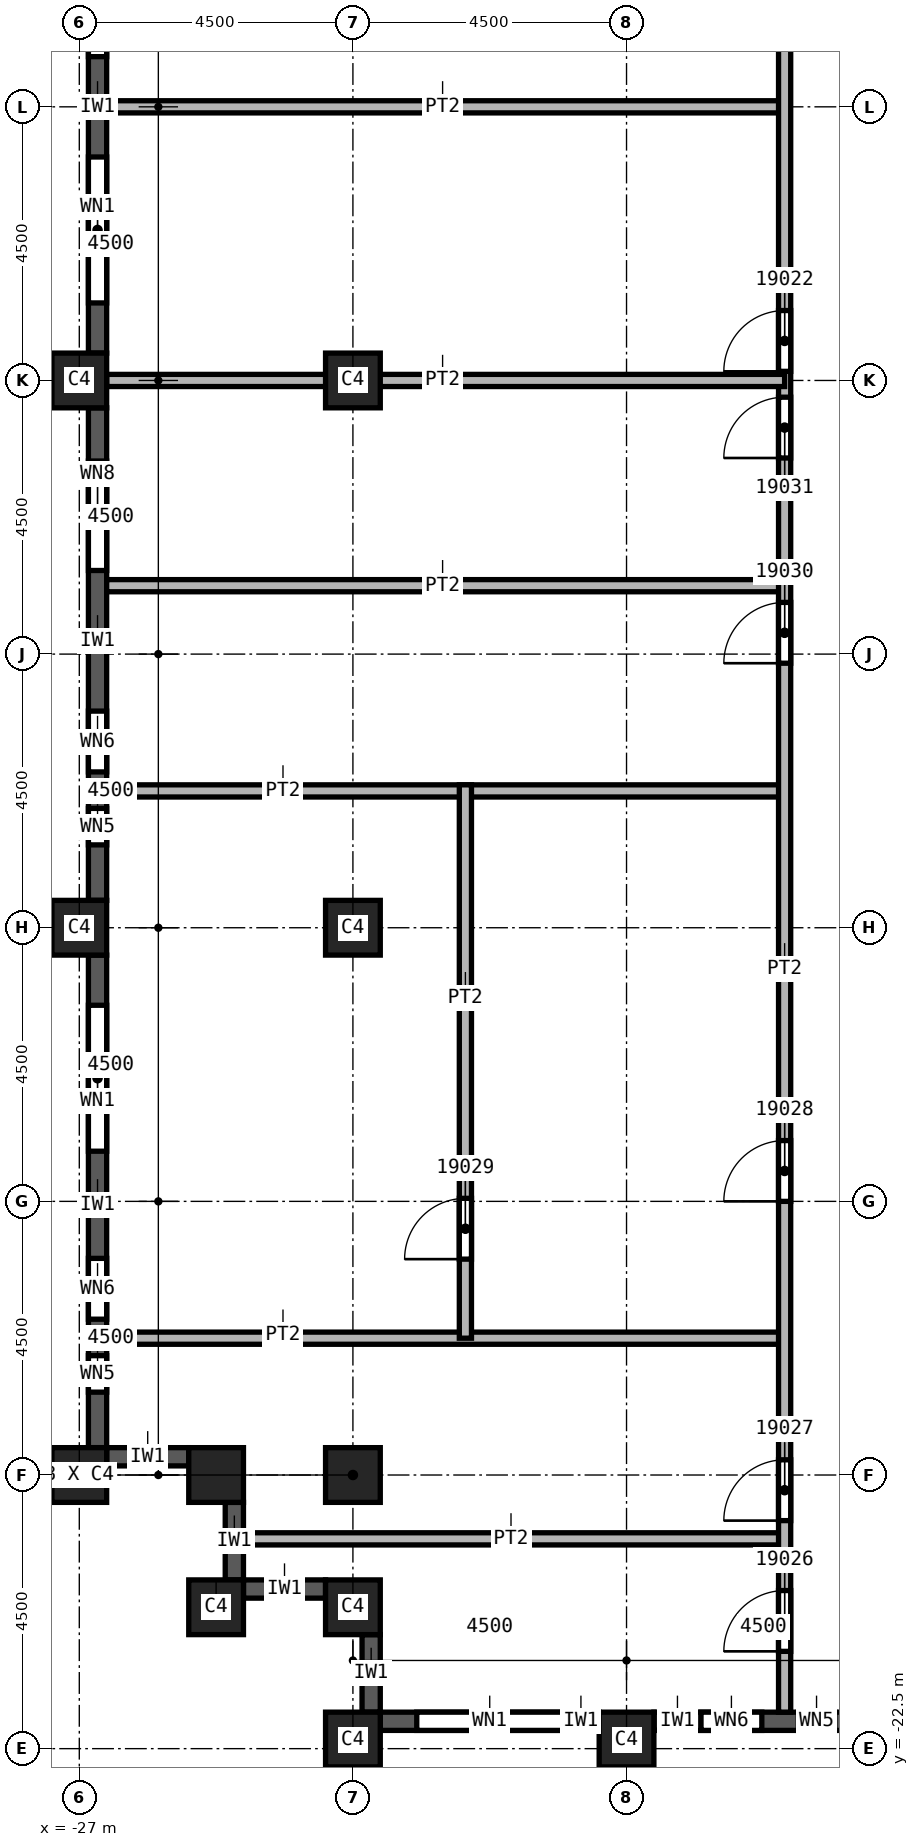
"""IFC4 building model, lengths in metres.
Left out: names, types, materials, properties, quantities, classifications, styles, units other than length and angle.
Written with IfcOpenShell. Run it as: python <this file> out.ifc"""

import sys

from ifc_helpers import new_model, si_unit, direction, frame, frame_2d, origin, origin_2d, place, context, subcontext, project, spatial, rectangle, extrude, element, fill, save


model = new_model("IFC4")
c1 = context("Model", 3, precision=1e-05, world=origin(), true_north=direction((0.0, 1.0)))
c2 = subcontext(c1, "Body", "Model", "MODEL_VIEW")
j1 = project(units=[si_unit("LENGTHUNIT", "METRE"), si_unit("PLANEANGLEUNIT", "RADIAN")], contexts=[c1])
p1 = place(None, origin())
s1 = spatial("IfcSite", under=j1, at=p1, CompositionType="ELEMENT")
p2 = place(p1, origin())
s2 = spatial("IfcBuilding", under=s1, at=p2, CompositionType="ELEMENT")
p3 = place(p2, frame((0.0, 0.0, 282.0)))
s3 = spatial("IfcBuildingStorey", under=s2, at=p3, CompositionType="ELEMENT", Elevation=282.0)
for number, where, z_axis, x_axis in (
    (1, (-22.5, 0.0, 0.0), (0.0, 0.0, 1.0), (1.0, 0.0, 0.0)),
    (2, (-22.5, -9.0, 0.0), (0.0, 0.0, 1.0), (1.0, 0.0, 0.0)),
    (3, (-22.5, -18.0, 0.0), (0.0, 0.0, 1.0), (1.0, 0.0, 0.0)),
    (4, (-18.0, -22.35, 0.0), (0.0, 0.0, 1.0), (1.0, 0.0, 0.0)),
    (5, (-22.5, -22.35, 0.0), (0.0, 0.0, 1.0), (1.0, 0.0, 0.0)),
    (6, (-27.0, 0.0, 0.0), (0.0, 0.0, 1.0), (0.0, 1.0, 0.0)),
    (7, (-27.0, -9.0, 0.0), (0.0, 0.0, 1.0), (0.0, 1.0, 0.0)),
    (8, (-27.0, -18.0, 0.0), (0.0, 0.0, 1.0), (0.0, 1.0, 0.0)),
    (9, (-22.5, -20.175, 0.0), (0.0, 0.0, 1.0), (1.0, 0.0, 0.0)),
    (10, (-24.75, -20.175, 0.0), (0.0, 0.0, 1.0), (1.0, 0.0, 0.0)),
    (11, (-24.75, -18.0, 0.0), (0.0, 0.0, 1.0), (1.0, 0.0, 0.0)),
):
    element("IfcColumn", number, at=place(p3, frame(where, z_axis=z_axis, x_axis=x_axis)), inside=s3, PredefinedType="COLUMN", context=c2, shape_type="SweptSolid", body=[
        extrude(rectangle(XDim=0.9, YDim=0.9, at=origin_2d()), origin(), (0.0, 0.0, 1.0), 3.72),
    ])
p4 = place(p3, frame((-26.7, 8.55, 0.0), z_axis=(0.0, 0.0, 1.0), x_axis=(0.0, -1.0, 0.0)))
e12 = element("IfcWall", 12, at=p4, inside=s3, PredefinedType="SOLIDWALL", context=c2, shape_type="SweptSolid", body=[
    extrude(rectangle(XDim=8.1, YDim=0.3, at=frame_2d((4.05, 0.0))), origin(), (0.0, 0.0, 1.0), 3.12),
])
p5 = place(p4, frame((0.825, 0.0, 0.8)))
e13 = element("IfcOpeningElement", 13, at=p5, cuts=e12, PredefinedType="OPENING", context=c2, shape_type="SweptSolid", body=[
    extrude(rectangle(XDim=2.4, YDim=1.95, at=frame_2d((1.2, 0.975))), frame((0.0, 0.15, 0.0), z_axis=(0.0, -1.0, 0.0), x_axis=(1.0, 0.0, 0.0)), (0.0, 0.0, 1.0), 0.3),
])
p6 = place(p4, frame((4.875, 0.0, 0.8)))
e14 = element("IfcOpeningElement", 14, at=p6, cuts=e12, PredefinedType="OPENING", context=c2, shape_type="SweptSolid", body=[
    extrude(rectangle(XDim=2.4, YDim=1.95, at=frame_2d((1.2, 0.975))), frame((0.0, 0.15, 0.0), z_axis=(0.0, -1.0, 0.0), x_axis=(1.0, 0.0, 0.0)), (0.0, 0.0, 1.0), 0.3),
])
p7 = place(p3, frame((-26.7, -0.45, 0.0), z_axis=(0.0, 0.0, 1.0), x_axis=(0.0, -1.0, 0.0)))
e15 = element("IfcWall", 15, at=p7, inside=s3, PredefinedType="SOLIDWALL", context=c2, shape_type="SweptSolid", body=[
    extrude(rectangle(XDim=8.1, YDim=0.3, at=frame_2d((4.05, 0.0))), origin(), (0.0, 0.0, 1.0), 3.12),
])
p8 = place(p7, frame((0.875, 0.0, 0.8)))
e16 = element("IfcOpeningElement", 16, at=p8, cuts=e15, PredefinedType="OPENING", context=c2, shape_type="SweptSolid", body=[
    extrude(rectangle(XDim=1.8, YDim=1.95, at=frame_2d((0.9, 0.975))), frame((0.0, 0.15, 0.0), z_axis=(0.0, -1.0, 0.0), x_axis=(1.0, 0.0, 0.0)), (0.0, 0.0, 1.0), 0.3),
])
p9 = place(p7, frame((4.988, 0.0, 0.8)))
e17 = element("IfcOpeningElement", 17, at=p9, cuts=e15, PredefinedType="OPENING", context=c2, shape_type="SweptSolid", body=[
    extrude(rectangle(XDim=1.0, YDim=1.95, at=frame_2d((0.5, 0.975))), frame((0.0, 0.15, 0.0), z_axis=(0.0, -1.0, 0.0), x_axis=(1.0, 0.0, 0.0)), (0.0, 0.0, 1.0), 0.3),
])
p10 = place(p7, frame((6.587, 0.0, 0.8)))
e18 = element("IfcOpeningElement", 18, at=p10, cuts=e15, PredefinedType="OPENING", context=c2, shape_type="SweptSolid", body=[
    extrude(rectangle(XDim=0.6, YDim=1.95, at=frame_2d((0.3, 0.975))), frame((0.0, 0.15, 0.0), z_axis=(0.0, -1.0, 0.0), x_axis=(1.0, 0.0, 0.0)), (0.0, 0.0, 1.0), 0.3),
])
p11 = place(p3, frame((-26.7, -9.45, 0.0), z_axis=(0.0, 0.0, 1.0), x_axis=(0.0, -1.0, 0.0)))
e19 = element("IfcWall", 19, at=p11, inside=s3, PredefinedType="SOLIDWALL", context=c2, shape_type="SweptSolid", body=[
    extrude(rectangle(XDim=8.1, YDim=0.3, at=frame_2d((4.05, 0.0))), origin(), (0.0, 0.0, 1.0), 3.12),
])
p12 = place(p11, frame((0.825, 0.0, 0.8)))
e20 = element("IfcOpeningElement", 20, at=p12, cuts=e19, PredefinedType="OPENING", context=c2, shape_type="SweptSolid", body=[
    extrude(rectangle(XDim=2.4, YDim=1.95, at=frame_2d((1.2, 0.975))), frame((0.0, 0.15, 0.0), z_axis=(0.0, -1.0, 0.0), x_axis=(1.0, 0.0, 0.0)), (0.0, 0.0, 1.0), 0.3),
])
p13 = place(p11, frame((4.988, 0.0, 0.8)))
e21 = element("IfcOpeningElement", 21, at=p13, cuts=e19, PredefinedType="OPENING", context=c2, shape_type="SweptSolid", body=[
    extrude(rectangle(XDim=1.0, YDim=1.95, at=frame_2d((0.5, 0.975))), frame((0.0, 0.15, 0.0), z_axis=(0.0, -1.0, 0.0), x_axis=(1.0, 0.0, 0.0)), (0.0, 0.0, 1.0), 0.3),
])
p14 = place(p11, frame((6.587, 0.0, 0.8)))
e22 = element("IfcOpeningElement", 22, at=p14, cuts=e19, PredefinedType="OPENING", context=c2, shape_type="SweptSolid", body=[
    extrude(rectangle(XDim=0.6, YDim=1.95, at=frame_2d((0.3, 0.975))), frame((0.0, 0.15, 0.0), z_axis=(0.0, -1.0, 0.0), x_axis=(1.0, 0.0, 0.0)), (0.0, 0.0, 1.0), 0.3),
])
p15 = place(p3, frame((-26.55, -17.7, 0.0), z_axis=(0.0, 0.0, 1.0), x_axis=(1.0, 0.0, 0.0)))
e23 = element("IfcWall", 23, at=p15, inside=s3, PredefinedType="SOLIDWALL", context=c2, shape_type="SweptSolid", body=[
    extrude(rectangle(XDim=1.35, YDim=0.3, at=frame_2d((0.675, 0.0))), origin(), (0.0, 0.0, 1.0), 3.12),
])
p16 = place(p3, frame((-24.45, -18.45, 0.0), z_axis=(0.0, 0.0, 1.0), x_axis=(0.0, -1.0, 0.0)))
e24 = element("IfcWall", 24, at=p16, inside=s3, PredefinedType="SOLIDWALL", context=c2, shape_type="SweptSolid", body=[
    extrude(rectangle(XDim=1.275, YDim=0.3, at=frame_2d((0.638, 0.0))), origin(), (0.0, 0.0, 1.0), 3.12),
])
p17 = place(p3, frame((-24.3, -19.875, 0.0), z_axis=(0.0, 0.0, 1.0), x_axis=(1.0, 0.0, 0.0)))
e25 = element("IfcWall", 25, at=p17, inside=s3, PredefinedType="SOLIDWALL", context=c2, shape_type="SweptSolid", body=[
    extrude(rectangle(XDim=1.35, YDim=0.3, at=frame_2d((0.675, 0.0))), origin(), (0.0, 0.0, 1.0), 3.12),
])
p18 = place(p3, frame((-22.2, -20.625, 0.0), z_axis=(0.0, 0.0, 1.0), x_axis=(0.0, -1.0, 0.0)))
e26 = element("IfcWall", 26, at=p18, inside=s3, PredefinedType="SOLIDWALL", context=c2, shape_type="SweptSolid", body=[
    extrude(rectangle(XDim=1.275, YDim=0.3, at=frame_2d((0.637, 0.0))), origin(), (0.0, 0.0, 1.0), 3.12),
])
p19 = place(p3, frame((-22.05, -22.05, 0.0), z_axis=(0.0, 0.0, 1.0), x_axis=(1.0, 0.0, 0.0)))
e27 = element("IfcWall", 27, at=p19, inside=s3, PredefinedType="SOLIDWALL", context=c2, shape_type="SweptSolid", body=[
    extrude(rectangle(XDim=3.6, YDim=0.3, at=frame_2d((1.8, 0.0))), origin(), (0.0, 0.0, 1.0), 3.12),
])
p20 = place(p19, frame((0.6, 0.0, 0.8)))
e28 = element("IfcOpeningElement", 28, at=p20, cuts=e27, PredefinedType="OPENING", context=c2, shape_type="SweptSolid", body=[
    extrude(rectangle(XDim=2.4, YDim=1.95, at=frame_2d((1.2, 0.975))), frame((0.0, 0.15, 0.0), z_axis=(0.0, -1.0, 0.0), x_axis=(1.0, 0.0, 0.0)), (0.0, 0.0, 1.0), 0.3),
])
p21 = place(p3, frame((-17.55, -22.05, 0.0), z_axis=(0.0, 0.0, 1.0), x_axis=(1.0, 0.0, 0.0)))
e29 = element("IfcWall", 29, at=p21, inside=s3, PredefinedType="SOLIDWALL", context=c2, shape_type="SweptSolid", body=[
    extrude(rectangle(XDim=3.6, YDim=0.3, at=frame_2d((1.8, 0.0))), origin(), (0.0, 0.0, 1.0), 3.12),
])
p22 = place(p21, frame((0.775, 0.0, 0.8)))
e30 = element("IfcOpeningElement", 30, at=p22, cuts=e29, PredefinedType="OPENING", context=c2, shape_type="SweptSolid", body=[
    extrude(rectangle(XDim=1.0, YDim=1.95, at=frame_2d((0.5, 0.975))), frame((0.0, 0.15, 0.0), z_axis=(0.0, -1.0, 0.0), x_axis=(1.0, 0.0, 0.0)), (0.0, 0.0, 1.0), 0.3),
])
p23 = place(p21, frame((2.375, 0.0, 0.8)))
e31 = element("IfcOpeningElement", 31, at=p23, cuts=e29, PredefinedType="OPENING", context=c2, shape_type="SweptSolid", body=[
    extrude(rectangle(XDim=0.6, YDim=1.95, at=frame_2d((0.3, 0.975))), frame((0.0, 0.15, 0.0), z_axis=(0.0, -1.0, 0.0), x_axis=(1.0, 0.0, 0.0)), (0.0, 0.0, 1.0), 0.3),
])
for number, where, z_axis, x_axis in (
    (32, (-26.55, -15.75, 0.0), (0.0, 0.0, 1.0), (1.0, 0.0, 0.0)),
    (33, (-26.55, -6.75, 0.0), (0.0, 0.0, 1.0), (1.0, 0.0, 0.0)),
    (34, (-26.55, -3.375, 0.0), (0.0, 0.0, 1.0), (1.0, 0.0, 0.0)),
    (35, (-26.55, 4.5, 0.0), (0.0, 0.0, 1.0), (1.0, 0.0, 0.0)),
):
    element("IfcWall", number, at=place(p3, frame(where, z_axis=z_axis, x_axis=x_axis)), inside=s3, PredefinedType="PARTITIONING", context=c2, shape_type="SweptSolid", body=[
        extrude(rectangle(XDim=11.15, YDim=0.2, at=frame_2d((5.575, 0.0))), origin(), (0.0, 0.0, 1.0), 3.72),
    ])
p24 = place(p3, frame((-24.3, -19.05, 0.0), z_axis=(0.0, 0.0, 1.0), x_axis=(1.0, 0.0, 0.0)))
e36 = element("IfcWall", 36, at=p24, inside=s3, PredefinedType="PARTITIONING", context=c2, shape_type="SweptSolid", body=[
    extrude(rectangle(XDim=8.9, YDim=0.2, at=frame_2d((4.45, 0.0))), origin(), (0.0, 0.0, 1.0), 3.72),
])
p25 = place(p3, frame((-20.65, -15.75, 0.0), z_axis=(0.0, 0.0, 1.0), x_axis=(0.0, 1.0, 0.0)))
e37 = element("IfcWall", 37, at=p25, inside=s3, PredefinedType="PARTITIONING", context=c2, shape_type="SweptSolid", body=[
    extrude(rectangle(XDim=9.1, YDim=0.2, at=frame_2d((4.55, 0.0))), origin(), (0.0, 0.0, 1.0), 3.72),
])
p26 = place(p25, frame((1.3, 0.0, 0.0)))
e38 = element("IfcOpeningElement", 38, at=p26, cuts=e37, PredefinedType="OPENING", context=c2, shape_type="SweptSolid", body=[
    extrude(rectangle(XDim=1.0, YDim=2.1, at=frame_2d((0.5, 1.05))), frame((0.0, 0.1, 0.0), z_axis=(0.0, -1.0, 0.0), x_axis=(1.0, 0.0, 0.0)), (0.0, 0.0, 1.0), 0.2),
])
p27 = place(p3, frame((-15.4, -21.9, 0.0), z_axis=(0.0, 0.0, 1.0), x_axis=(0.0, 1.0, 0.0)))
e39 = element("IfcWall", 39, at=p27, inside=s3, PredefinedType="PARTITIONING", context=c2, shape_type="SweptSolid", body=[
    extrude(rectangle(XDim=35.5, YDim=0.2, at=frame_2d((17.75, 0.0))), origin(), (0.0, 0.0, 1.0), 3.72),
])
p28 = place(p27, frame((22.05, 0.0, 0.0)))
e40 = element("IfcOpeningElement", 40, at=p28, cuts=e39, PredefinedType="OPENING", context=c2, shape_type="SweptSolid", body=[
    extrude(rectangle(XDim=1.0, YDim=2.1, at=frame_2d((0.5, 1.05))), frame((0.0, 0.1, 0.0), z_axis=(0.0, -1.0, 0.0), x_axis=(1.0, 0.0, 0.0)), (0.0, 0.0, 1.0), 0.2),
])
p29 = place(p27, frame((29.7, 0.0, 0.0)))
e41 = element("IfcOpeningElement", 41, at=p29, cuts=e39, PredefinedType="OPENING", context=c2, shape_type="SweptSolid", body=[
    extrude(rectangle(XDim=1.0, YDim=2.1, at=frame_2d((0.5, 1.05))), frame((0.0, 0.1, 0.0), z_axis=(0.0, -1.0, 0.0), x_axis=(1.0, 0.0, 0.0)), (0.0, 0.0, 1.0), 0.2),
])
p30 = place(p27, frame((1.0, 0.0, 0.0)))
e42 = element("IfcOpeningElement", 42, at=p30, cuts=e39, PredefinedType="OPENING", context=c2, shape_type="SweptSolid", body=[
    extrude(rectangle(XDim=1.0, YDim=2.1, at=frame_2d((0.5, 1.05))), frame((0.0, 0.1, 0.0), z_axis=(0.0, -1.0, 0.0), x_axis=(1.0, 0.0, 0.0)), (0.0, 0.0, 1.0), 0.2),
])
p31 = place(p27, frame((3.15, 0.0, 0.0)))
e43 = element("IfcOpeningElement", 43, at=p31, cuts=e39, PredefinedType="OPENING", context=c2, shape_type="SweptSolid", body=[
    extrude(rectangle(XDim=1.0, YDim=2.1, at=frame_2d((0.5, 1.05))), frame((0.0, 0.1, 0.0), z_axis=(0.0, -1.0, 0.0), x_axis=(1.0, 0.0, 0.0)), (0.0, 0.0, 1.0), 0.2),
])
p32 = place(p27, frame((8.4, 0.0, 0.0)))
e44 = element("IfcOpeningElement", 44, at=p32, cuts=e39, PredefinedType="OPENING", context=c2, shape_type="SweptSolid", body=[
    extrude(rectangle(XDim=1.0, YDim=2.1, at=frame_2d((0.5, 1.05))), frame((0.0, 0.1, 0.0), z_axis=(0.0, -1.0, 0.0), x_axis=(1.0, 0.0, 0.0)), (0.0, 0.0, 1.0), 0.2),
])
p33 = place(p27, frame((17.25, 0.0, 0.0)))
e45 = element("IfcOpeningElement", 45, at=p33, cuts=e39, PredefinedType="OPENING", context=c2, shape_type="SweptSolid", body=[
    extrude(rectangle(XDim=1.0, YDim=2.1, at=frame_2d((0.5, 1.05))), frame((0.0, 0.1, 0.0), z_axis=(0.0, -1.0, 0.0), x_axis=(1.0, 0.0, 0.0)), (0.0, 0.0, 1.0), 0.2),
])
p34 = place(p27, frame((20.625, 0.0, 0.0)))
e46 = element("IfcOpeningElement", 46, at=p34, cuts=e39, PredefinedType="OPENING", context=c2, shape_type="SweptSolid", body=[
    extrude(rectangle(XDim=1.0, YDim=2.1, at=frame_2d((0.5, 1.05))), frame((0.0, 0.1, 0.0), z_axis=(0.0, -1.0, 0.0), x_axis=(1.0, 0.0, 0.0)), (0.0, 0.0, 1.0), 0.2),
])
p35 = place(p3, frame((-15.4, 0.0, 0.0), z_axis=(0.0, 0.0, 1.0), x_axis=(-1.0, 0.0, 0.0)))
e47 = element("IfcWall", 47, at=p35, inside=s3, PredefinedType="PARTITIONING", context=c2, shape_type="SweptSolid", body=[
    extrude(rectangle(XDim=11.15, YDim=0.2, at=frame_2d((5.575, 0.0))), origin(), (0.0, 0.0, 1.0), 3.72),
])
p36 = place(p5, origin())
e48 = element("IfcWindow", 48, at=p36, inside=s3, PartitioningType="SINGLE_PANEL", PredefinedType="WINDOW", context=c2, shape_type="SweptSolid", body=[
    extrude(rectangle(XDim=2.4, YDim=1.95, at=frame_2d((1.2, 0.975))), frame((0.0, 0.03, 0.0), z_axis=(0.0, -1.0, 0.0), x_axis=(1.0, 0.0, 0.0)), (0.0, 0.0, 1.0), 0.06),
])
fill(e13, e48)
p37 = place(p6, origin())
e49 = element("IfcWindow", 49, at=p37, inside=s3, PartitioningType="SINGLE_PANEL", PredefinedType="WINDOW", context=c2, shape_type="SweptSolid", body=[
    extrude(rectangle(XDim=2.4, YDim=1.95, at=frame_2d((1.2, 0.975))), frame((0.0, 0.03, 0.0), z_axis=(0.0, -1.0, 0.0), x_axis=(1.0, 0.0, 0.0)), (0.0, 0.0, 1.0), 0.06),
])
fill(e14, e49)
p38 = place(p12, origin())
e50 = element("IfcWindow", 50, at=p38, inside=s3, PartitioningType="SINGLE_PANEL", PredefinedType="WINDOW", context=c2, shape_type="SweptSolid", body=[
    extrude(rectangle(XDim=2.4, YDim=1.95, at=frame_2d((1.2, 0.975))), frame((0.0, 0.03, 0.0), z_axis=(0.0, -1.0, 0.0), x_axis=(1.0, 0.0, 0.0)), (0.0, 0.0, 1.0), 0.06),
])
fill(e20, e50)
p39 = place(p20, origin())
e51 = element("IfcWindow", 51, at=p39, inside=s3, PartitioningType="SINGLE_PANEL", PredefinedType="WINDOW", context=c2, shape_type="SweptSolid", body=[
    extrude(rectangle(XDim=2.4, YDim=1.95, at=frame_2d((1.2, 0.975))), frame((0.0, 0.03, 0.0), z_axis=(0.0, -1.0, 0.0), x_axis=(1.0, 0.0, 0.0)), (0.0, 0.0, 1.0), 0.06),
])
fill(e28, e51)
p40 = place(p28, origin())
e52 = element("IfcDoor", 52, at=p40, inside=s3, OperationType="SINGLE_SWING_LEFT", PredefinedType="DOOR", context=c2, shape_type="SweptSolid", body=[
    extrude(rectangle(XDim=1.0, YDim=2.1, at=frame_2d((0.5, 1.05))), frame((0.0, 0.025, 0.0), z_axis=(0.0, -1.0, 0.0), x_axis=(1.0, 0.0, 0.0)), (0.0, 0.0, 1.0), 0.05),
])
fill(e40, e52)
p41 = place(p30, origin())
e53 = element("IfcDoor", 53, at=p41, inside=s3, OperationType="SINGLE_SWING_LEFT", PredefinedType="DOOR", context=c2, shape_type="SweptSolid", body=[
    extrude(rectangle(XDim=1.0, YDim=2.1, at=frame_2d((0.5, 1.05))), frame((0.0, 0.025, 0.0), z_axis=(0.0, -1.0, 0.0), x_axis=(1.0, 0.0, 0.0)), (0.0, 0.0, 1.0), 0.05),
])
fill(e42, e53)
p42 = place(p31, origin())
e54 = element("IfcDoor", 54, at=p42, inside=s3, OperationType="SINGLE_SWING_RIGHT", PredefinedType="DOOR", context=c2, shape_type="SweptSolid", body=[
    extrude(rectangle(XDim=1.0, YDim=2.1, at=frame_2d((0.5, 1.05))), frame((0.0, 0.025, 0.0), z_axis=(0.0, -1.0, 0.0), x_axis=(1.0, 0.0, 0.0)), (0.0, 0.0, 1.0), 0.05),
])
fill(e43, e54)
p43 = place(p32, origin())
e55 = element("IfcDoor", 55, at=p43, inside=s3, OperationType="SINGLE_SWING_LEFT", PredefinedType="DOOR", context=c2, shape_type="SweptSolid", body=[
    extrude(rectangle(XDim=1.0, YDim=2.1, at=frame_2d((0.5, 1.05))), frame((0.0, 0.025, 0.0), z_axis=(0.0, -1.0, 0.0), x_axis=(1.0, 0.0, 0.0)), (0.0, 0.0, 1.0), 0.05),
])
fill(e44, e55)
p44 = place(p26, origin())
e56 = element("IfcDoor", 56, at=p44, inside=s3, OperationType="SINGLE_SWING_RIGHT", PredefinedType="DOOR", context=c2, shape_type="SweptSolid", body=[
    extrude(rectangle(XDim=1.0, YDim=2.1, at=frame_2d((0.5, 1.05))), frame((0.0, 0.025, 0.0), z_axis=(0.0, -1.0, 0.0), x_axis=(1.0, 0.0, 0.0)), (0.0, 0.0, 1.0), 0.05),
])
fill(e38, e56)
p45 = place(p33, origin())
e57 = element("IfcDoor", 57, at=p45, inside=s3, OperationType="SINGLE_SWING_LEFT", PredefinedType="DOOR", context=c2, shape_type="SweptSolid", body=[
    extrude(rectangle(XDim=1.0, YDim=2.1, at=frame_2d((0.5, 1.05))), frame((0.0, 0.025, 0.0), z_axis=(0.0, -1.0, 0.0), x_axis=(1.0, 0.0, 0.0)), (0.0, 0.0, 1.0), 0.05),
])
fill(e45, e57)
p46 = place(p34, origin())
e58 = element("IfcDoor", 58, at=p46, inside=s3, OperationType="SINGLE_SWING_RIGHT", PredefinedType="DOOR", context=c2, shape_type="SweptSolid", body=[
    extrude(rectangle(XDim=1.0, YDim=2.1, at=frame_2d((0.5, 1.05))), frame((0.0, 0.025, 0.0), z_axis=(0.0, -1.0, 0.0), x_axis=(1.0, 0.0, 0.0)), (0.0, 0.0, 1.0), 0.05),
])
fill(e46, e58)
p47 = place(p8, origin())
e59 = element("IfcWindow", 59, at=p47, inside=s3, PartitioningType="SINGLE_PANEL", PredefinedType="WINDOW", context=c2, shape_type="SweptSolid", body=[
    extrude(rectangle(XDim=1.8, YDim=1.95, at=frame_2d((0.9, 0.975))), frame((0.0, 0.03, 0.0), z_axis=(0.0, -1.0, 0.0), x_axis=(1.0, 0.0, 0.0)), (0.0, 0.0, 1.0), 0.06),
])
fill(e16, e59)
p48 = place(p9, origin())
e60 = element("IfcWindow", 60, at=p48, inside=s3, PartitioningType="SINGLE_PANEL", PredefinedType="WINDOW", context=c2, shape_type="SweptSolid", body=[
    extrude(rectangle(XDim=1.0, YDim=1.95, at=frame_2d((0.5, 0.975))), frame((0.0, 0.03, 0.0), z_axis=(0.0, -1.0, 0.0), x_axis=(1.0, 0.0, 0.0)), (0.0, 0.0, 1.0), 0.06),
])
fill(e17, e60)
p49 = place(p10, origin())
e61 = element("IfcWindow", 61, at=p49, inside=s3, PartitioningType="SINGLE_PANEL", PredefinedType="WINDOW", context=c2, shape_type="SweptSolid", body=[
    extrude(rectangle(XDim=0.6, YDim=1.95, at=frame_2d((0.3, 0.975))), frame((0.0, 0.03, 0.0), z_axis=(0.0, -1.0, 0.0), x_axis=(1.0, 0.0, 0.0)), (0.0, 0.0, 1.0), 0.06),
])
fill(e18, e61)
p50 = place(p13, origin())
e62 = element("IfcWindow", 62, at=p50, inside=s3, PartitioningType="SINGLE_PANEL", PredefinedType="WINDOW", context=c2, shape_type="SweptSolid", body=[
    extrude(rectangle(XDim=1.0, YDim=1.95, at=frame_2d((0.5, 0.975))), frame((0.0, 0.03, 0.0), z_axis=(0.0, -1.0, 0.0), x_axis=(1.0, 0.0, 0.0)), (0.0, 0.0, 1.0), 0.06),
])
fill(e21, e62)
p51 = place(p14, origin())
e63 = element("IfcWindow", 63, at=p51, inside=s3, PartitioningType="SINGLE_PANEL", PredefinedType="WINDOW", context=c2, shape_type="SweptSolid", body=[
    extrude(rectangle(XDim=0.6, YDim=1.95, at=frame_2d((0.3, 0.975))), frame((0.0, 0.03, 0.0), z_axis=(0.0, -1.0, 0.0), x_axis=(1.0, 0.0, 0.0)), (0.0, 0.0, 1.0), 0.06),
])
fill(e22, e63)
p52 = place(p22, origin())
e64 = element("IfcWindow", 64, at=p52, inside=s3, PartitioningType="SINGLE_PANEL", PredefinedType="WINDOW", context=c2, shape_type="SweptSolid", body=[
    extrude(rectangle(XDim=1.0, YDim=1.95, at=frame_2d((0.5, 0.975))), frame((0.0, 0.03, 0.0), z_axis=(0.0, -1.0, 0.0), x_axis=(1.0, 0.0, 0.0)), (0.0, 0.0, 1.0), 0.06),
])
fill(e30, e64)
p53 = place(p23, origin())
e65 = element("IfcWindow", 65, at=p53, inside=s3, PartitioningType="SINGLE_PANEL", PredefinedType="WINDOW", context=c2, shape_type="SweptSolid", body=[
    extrude(rectangle(XDim=0.6, YDim=1.95, at=frame_2d((0.3, 0.975))), frame((0.0, 0.03, 0.0), z_axis=(0.0, -1.0, 0.0), x_axis=(1.0, 0.0, 0.0)), (0.0, 0.0, 1.0), 0.06),
])
fill(e31, e65)
save(model, sys.argv[1])
